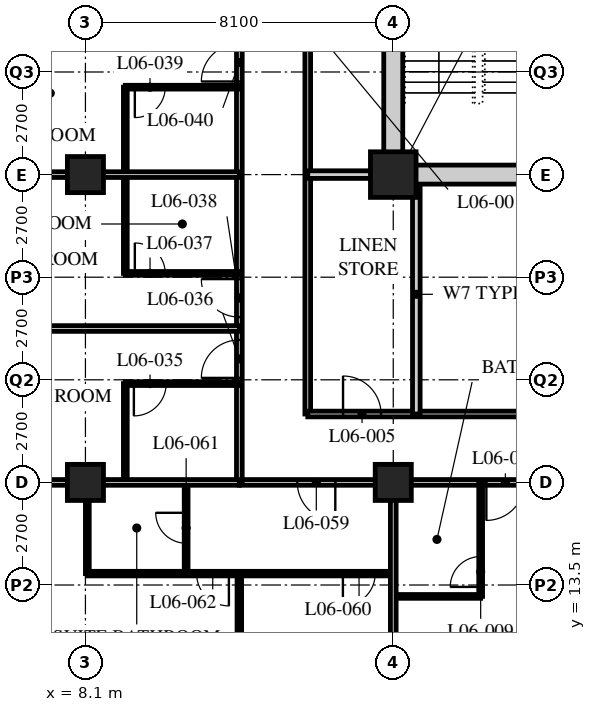
"""IFC4 building model, lengths in metres.
Left out: names, types, materials, properties, quantities, classifications, styles, units other than length and angle.
Written with IfcOpenShell. Run it as: python <this file> out.ifc"""

import sys

from ifc_helpers import new_model, si_unit, direction, frame, frame_2d, origin, origin_2d, place, context, subcontext, project, spatial, rectangle, hollow_rectangle, extrude, element, fill, save


model = new_model("IFC4")
c1 = context("Model", 3, precision=1e-05, world=origin(), true_north=direction((0.0, 1.0)))
c2 = subcontext(c1, "Body", "Model", "MODEL_VIEW")
j1 = project(units=[si_unit("LENGTHUNIT", "METRE"), si_unit("PLANEANGLEUNIT", "RADIAN")], contexts=[c1])
p1 = place(None, origin())
s1 = spatial("IfcSite", under=j1, at=p1, CompositionType="ELEMENT")
p2 = place(p1, origin())
s2 = spatial("IfcBuilding", under=s1, at=p2, CompositionType="ELEMENT")
p3 = place(p2, frame((0.0, 0.0, 33.0)))
s3 = spatial("IfcBuildingStorey", under=s2, at=p3, CompositionType="ELEMENT", Elevation=33.0)
for number, where, z_axis, x_axis in (
    (1, (8.1, 16.2, 0.0), (0.0, 0.0, 1.0), (1.0, 0.0, 0.0)),
    (2, (8.1, 24.3, 0.0), (0.0, 0.0, 1.0), (1.0, 0.0, 0.0)),
    (3, (16.2, 16.2, 0.0), (0.0, 0.0, 1.0), (1.0, 0.0, 0.0)),
):
    element("IfcColumn", number, at=place(p3, frame(where, z_axis=z_axis, x_axis=x_axis)), inside=s3, PredefinedType="COLUMN", context=c2, shape_type="SweptSolid", body=[
        extrude(hollow_rectangle(XDim=0.95, YDim=0.95, WallThickness=0.095, at=origin_2d()), origin(), (0.0, 0.0, 1.0), 3.4),
    ])
p4 = place(p3, frame((16.2, 24.3, 0.0), z_axis=(0.0, 0.0, 1.0), x_axis=(1.0, 0.0, 0.0)))
e4 = element("IfcColumn", 4, at=p4, inside=s3, PredefinedType="COLUMN", context=c2, shape_type="SweptSolid", body=[
    extrude(hollow_rectangle(XDim=1.2, YDim=1.2, WallThickness=0.12, at=origin_2d()), origin(), (0.0, 0.0, 1.0), 3.4),
])
p5 = place(p3, frame((12.15, 16.2, 0.0), z_axis=(0.0, 0.0, 1.0), x_axis=(1.0, 0.0, 0.0)))
e5 = element("IfcWall", 5, at=p5, inside=s3, PredefinedType="PARTITIONING", context=c2, shape_type="SweptSolid", body=[
    extrude(rectangle(XDim=32.4, YDim=0.15, at=frame_2d((16.2, 0.0))), origin(), (0.0, 0.0, 1.0), 2.578),
])
p6 = place(p5, frame((6.5, 0.0, 0.0)))
e6 = element("IfcOpeningElement", 6, at=p6, cuts=e5, PredefinedType="OPENING", context=c2, shape_type="SweptSolid", body=[
    extrude(rectangle(XDim=1.0, YDim=2.1, at=frame_2d((0.5, 1.05))), frame((0.0, 0.085, 0.0), z_axis=(0.0, -1.0, 0.0), x_axis=(1.0, 0.0, 0.0)), (0.0, 0.0, 1.0), 0.17),
])
p7 = place(p5, frame((8.4, 0.0, 0.0)))
e7 = element("IfcOpeningElement", 7, at=p7, cuts=e5, PredefinedType="OPENING", context=c2, shape_type="SweptSolid", body=[
    extrude(rectangle(XDim=1.0, YDim=2.1, at=frame_2d((0.5, 1.05))), frame((0.0, 0.085, 0.0), z_axis=(0.0, -1.0, 0.0), x_axis=(1.0, 0.0, 0.0)), (0.0, 0.0, 1.0), 0.17),
])
p8 = place(p5, frame((14.6, 0.0, 0.0)))
e8 = element("IfcOpeningElement", 8, at=p8, cuts=e5, PredefinedType="OPENING", context=c2, shape_type="SweptSolid", body=[
    extrude(rectangle(XDim=1.0, YDim=2.1, at=frame_2d((0.5, 1.05))), frame((0.0, 0.085, 0.0), z_axis=(0.0, -1.0, 0.0), x_axis=(1.0, 0.0, 0.0)), (0.0, 0.0, 1.0), 0.17),
])
p9 = place(p5, frame((16.5, 0.0, 0.0)))
e9 = element("IfcOpeningElement", 9, at=p9, cuts=e5, PredefinedType="OPENING", context=c2, shape_type="SweptSolid", body=[
    extrude(rectangle(XDim=1.0, YDim=2.1, at=frame_2d((0.5, 1.05))), frame((0.0, 0.085, 0.0), z_axis=(0.0, -1.0, 0.0), x_axis=(1.0, 0.0, 0.0)), (0.0, 0.0, 1.0), 0.17),
])
p10 = place(p5, frame((23.0, 0.0, 0.0)))
e10 = element("IfcOpeningElement", 10, at=p10, cuts=e5, PredefinedType="OPENING", context=c2, shape_type="SweptSolid", body=[
    extrude(rectangle(XDim=1.0, YDim=2.1, at=frame_2d((0.5, 1.05))), frame((0.0, 0.085, 0.0), z_axis=(0.0, -1.0, 0.0), x_axis=(1.0, 0.0, 0.0)), (0.0, 0.0, 1.0), 0.17),
])
p11 = place(p5, frame((24.6, 0.0, 0.0)))
e11 = element("IfcOpeningElement", 11, at=p11, cuts=e5, PredefinedType="OPENING", context=c2, shape_type="SweptSolid", body=[
    extrude(rectangle(XDim=1.0, YDim=2.1, at=frame_2d((0.5, 1.05))), frame((0.0, 0.085, 0.0), z_axis=(0.0, -1.0, 0.0), x_axis=(1.0, 0.0, 0.0)), (0.0, 0.0, 1.0), 0.17),
])
p12 = place(p5, frame((1.525, 0.0, 0.0)))
e12 = element("IfcOpeningElement", 12, at=p12, cuts=e5, PredefinedType="OPENING", context=c2, shape_type="SweptSolid", body=[
    extrude(rectangle(XDim=1.0, YDim=2.1, at=frame_2d((0.5, 1.05))), frame((0.0, 0.085, 0.0), z_axis=(0.0, -1.0, 0.0), x_axis=(1.0, 0.0, 0.0)), (0.0, 0.0, 1.0), 0.17),
])
p13 = place(p5, frame((29.875, 0.0, 0.0)))
e13 = element("IfcOpeningElement", 13, at=p13, cuts=e5, PredefinedType="OPENING", context=c2, shape_type="SweptSolid", body=[
    extrude(rectangle(XDim=1.0, YDim=2.1, at=frame_2d((0.5, 1.05))), frame((0.0, 0.085, 0.0), z_axis=(0.0, -1.0, 0.0), x_axis=(1.0, 0.0, 0.0)), (0.0, 0.0, 1.0), 0.17),
])
p14 = place(p3, frame((12.15, 16.2, 0.0), z_axis=(0.0, 0.0, 1.0), x_axis=(0.0, 1.0, 0.0)))
e14 = element("IfcWall", 14, at=p14, inside=s3, PredefinedType="PARTITIONING", context=c2, shape_type="SweptSolid", body=[
    extrude(rectangle(XDim=26.1, YDim=0.15, at=frame_2d((13.05, 0.0))), origin(), (0.0, 0.0, 1.0), 3.19),
])
p15 = place(p14, frame((2.75, 0.0, 0.0)))
e15 = element("IfcOpeningElement", 15, at=p15, cuts=e14, PredefinedType="OPENING", context=c2, shape_type="SweptSolid", body=[
    extrude(rectangle(XDim=1.0, YDim=2.1, at=frame_2d((0.5, 1.05))), frame((0.0, 0.085, 0.0), z_axis=(0.0, -1.0, 0.0), x_axis=(1.0, 0.0, 0.0)), (0.0, 0.0, 1.0), 0.17),
])
p16 = place(p14, frame((4.35, 0.0, 0.0)))
e16 = element("IfcOpeningElement", 16, at=p16, cuts=e14, PredefinedType="OPENING", context=c2, shape_type="SweptSolid", body=[
    extrude(rectangle(XDim=1.0, YDim=2.1, at=frame_2d((0.5, 1.05))), frame((0.0, 0.085, 0.0), z_axis=(0.0, -1.0, 0.0), x_axis=(1.0, 0.0, 0.0)), (0.0, 0.0, 1.0), 0.17),
])
p17 = place(p14, frame((10.55, 0.0, 0.0)))
e17 = element("IfcOpeningElement", 17, at=p17, cuts=e14, PredefinedType="OPENING", context=c2, shape_type="SweptSolid", body=[
    extrude(rectangle(XDim=1.0, YDim=2.1, at=frame_2d((0.5, 1.05))), frame((0.0, 0.085, 0.0), z_axis=(0.0, -1.0, 0.0), x_axis=(1.0, 0.0, 0.0)), (0.0, 0.0, 1.0), 0.17),
])
p18 = place(p14, frame((12.45, 0.0, 0.0)))
e18 = element("IfcOpeningElement", 18, at=p18, cuts=e14, PredefinedType="OPENING", context=c2, shape_type="SweptSolid", body=[
    extrude(rectangle(XDim=1.0, YDim=2.1, at=frame_2d((0.5, 1.05))), frame((0.0, 0.085, 0.0), z_axis=(0.0, -1.0, 0.0), x_axis=(1.0, 0.0, 0.0)), (0.0, 0.0, 1.0), 0.17),
])
p19 = place(p14, frame((18.65, 0.0, 0.0)))
e19 = element("IfcOpeningElement", 19, at=p19, cuts=e14, PredefinedType="OPENING", context=c2, shape_type="SweptSolid", body=[
    extrude(rectangle(XDim=1.0, YDim=2.1, at=frame_2d((0.5, 1.05))), frame((0.0, 0.085, 0.0), z_axis=(0.0, -1.0, 0.0), x_axis=(1.0, 0.0, 0.0)), (0.0, 0.0, 1.0), 0.17),
])
p20 = place(p14, frame((22.65, 0.0, 0.0)))
e20 = element("IfcOpeningElement", 20, at=p20, cuts=e14, PredefinedType="OPENING", context=c2, shape_type="SweptSolid", body=[
    extrude(rectangle(XDim=1.0, YDim=2.1, at=frame_2d((0.5, 1.05))), frame((0.0, 0.085, 0.0), z_axis=(0.0, -1.0, 0.0), x_axis=(1.0, 0.0, 0.0)), (0.0, 0.0, 1.0), 0.17),
])
p21 = place(p3, frame((13.95, 40.5, 0.0), z_axis=(0.0, 0.0, 1.0), x_axis=(0.0, -1.0, 0.0)))
e21 = element("IfcWall", 21, at=p21, inside=s3, PredefinedType="PARTITIONING", context=c2, shape_type="SweptSolid", body=[
    extrude(rectangle(XDim=22.5, YDim=0.15, at=frame_2d((11.25, 0.0))), origin(), (0.0, 0.0, 1.0), 3.19),
])
p22 = place(p21, frame((11.65, 0.0, 0.0)))
e22 = element("IfcOpeningElement", 22, at=p22, cuts=e21, PredefinedType="OPENING", context=c2, shape_type="SweptSolid", body=[
    extrude(rectangle(XDim=1.0, YDim=2.1, at=frame_2d((0.5, 1.05))), frame((0.0, 0.085, 0.0), z_axis=(0.0, -1.0, 0.0), x_axis=(1.0, 0.0, 0.0)), (0.0, 0.0, 1.0), 0.17),
])
p23 = place(p21, frame((3.55, 0.0, 0.0)))
e23 = element("IfcOpeningElement", 23, at=p23, cuts=e21, PredefinedType="OPENING", context=c2, shape_type="SweptSolid", body=[
    extrude(rectangle(XDim=1.0, YDim=2.1, at=frame_2d((0.5, 1.05))), frame((0.0, 0.085, 0.0), z_axis=(0.0, -1.0, 0.0), x_axis=(1.0, 0.0, 0.0)), (0.0, 0.0, 1.0), 0.17),
])
p24 = place(p3, frame((13.95, 18.0, 0.0), z_axis=(0.0, 0.0, 1.0), x_axis=(1.0, 0.0, 0.0)))
e24 = element("IfcWall", 24, at=p24, inside=s3, PredefinedType="PARTITIONING", context=c2, shape_type="SweptSolid", body=[
    extrude(rectangle(XDim=13.19, YDim=0.15, at=frame_2d((6.595, 0.0))), origin(), (0.0, 0.0, 1.0), 3.19),
])
p25 = place(p24, frame((0.929, 0.0, 0.0)))
e25 = element("IfcOpeningElement", 25, at=p25, cuts=e24, PredefinedType="OPENING", context=c2, shape_type="SweptSolid", body=[
    extrude(rectangle(XDim=1.0, YDim=2.1, at=frame_2d((0.5, 1.05))), frame((0.0, 0.085, 0.0), z_axis=(0.0, -1.0, 0.0), x_axis=(1.0, 0.0, 0.0)), (0.0, 0.0, 1.0), 0.17),
])
p26 = place(p24, frame((7.529, 0.0, 0.0)))
e26 = element("IfcOpeningElement", 26, at=p26, cuts=e24, PredefinedType="OPENING", context=c2, shape_type="SweptSolid", body=[
    extrude(rectangle(XDim=1.0, YDim=2.1, at=frame_2d((0.5, 1.05))), frame((0.0, 0.085, 0.0), z_axis=(0.0, -1.0, 0.0), x_axis=(1.0, 0.0, 0.0)), (0.0, 0.0, 1.0), 0.17),
])
p27 = place(p3, frame((16.807, 18.0, 0.0), z_axis=(0.0, 0.0, 1.0), x_axis=(0.0, 1.0, 0.0)))
e27 = element("IfcWall", 27, at=p27, inside=s3, PredefinedType="SOLIDWALL", context=c2, shape_type="SweptSolid", body=[
    extrude(rectangle(XDim=6.3, YDim=0.2, at=frame_2d((3.15, 0.0))), origin(), (0.0, 0.0, 1.0), 3.19),
])
p28 = place(p3, frame((13.95, 24.3, 0.0), z_axis=(0.0, 0.0, 1.0), x_axis=(1.0, 0.0, 0.0)))
e28 = element("IfcWall", 28, at=p28, inside=s3, PredefinedType="SOLIDWALL", context=c2, shape_type="SweptSolid", body=[
    extrude(rectangle(XDim=2.25, YDim=0.2, at=frame_2d((1.125, 0.0))), origin(), (0.0, 0.0, 1.0), 2.578),
])
p29 = place(p3, frame((16.2, 13.2, 0.0), z_axis=(0.0, 0.0, 1.0), x_axis=(1.0, 0.0, 0.0)))
e29 = element("IfcWall", 29, at=p29, inside=s3, PredefinedType="PARTITIONING", context=c2, shape_type="SweptSolid", body=[
    extrude(rectangle(XDim=2.3, YDim=0.1, at=frame_2d((1.15, 0.0))), origin(), (0.0, 0.0, 1.0), 3.19),
])
p30 = place(p3, frame((18.5, 16.2, 0.0), z_axis=(0.0, 0.0, 1.0), x_axis=(0.0, -1.0, 0.0)))
e30 = element("IfcWall", 30, at=p30, inside=s3, PredefinedType="PARTITIONING", context=c2, shape_type="SweptSolid", body=[
    extrude(rectangle(XDim=3.0, YDim=0.1, at=frame_2d((1.5, 0.0))), origin(), (0.0, 0.0, 1.0), 3.19),
])
p31 = place(p30, frame((1.95, 0.0, 0.0)))
e31 = element("IfcOpeningElement", 31, at=p31, cuts=e30, PredefinedType="OPENING", context=c2, shape_type="SweptSolid", body=[
    extrude(rectangle(XDim=0.8, YDim=2.1, at=frame_2d((0.4, 1.05))), frame((0.0, 0.06, 0.0), z_axis=(0.0, -1.0, 0.0), x_axis=(1.0, 0.0, 0.0)), (0.0, 0.0, 1.0), 0.12),
])
p32 = place(p3, frame((9.15, 16.2, 0.0), z_axis=(0.0, 0.0, 1.0), x_axis=(0.0, 1.0, 0.0)))
e32 = element("IfcWall", 32, at=p32, inside=s3, PredefinedType="PARTITIONING", context=c2, shape_type="SweptSolid", body=[
    extrude(rectangle(XDim=2.6, YDim=0.1, at=frame_2d((1.3, 0.0))), origin(), (0.0, 0.0, 1.0), 3.19),
])
p33 = place(p3, frame((12.15, 18.8, 0.0), z_axis=(0.0, 0.0, 1.0), x_axis=(-1.0, 0.0, 0.0)))
e33 = element("IfcWall", 33, at=p33, inside=s3, PredefinedType="PARTITIONING", context=c2, shape_type="SweptSolid", body=[
    extrude(rectangle(XDim=3.0, YDim=0.1, at=frame_2d((1.5, 0.0))), origin(), (0.0, 0.0, 1.0), 3.19),
])
p34 = place(p33, frame((1.925, 0.0, 0.0)))
e34 = element("IfcOpeningElement", 34, at=p34, cuts=e33, PredefinedType="OPENING", context=c2, shape_type="SweptSolid", body=[
    extrude(rectangle(XDim=0.85, YDim=2.1, at=frame_2d((0.425, 1.05))), frame((0.0, 0.06, 0.0), z_axis=(0.0, -1.0, 0.0), x_axis=(1.0, 0.0, 0.0)), (0.0, 0.0, 1.0), 0.12),
])
p35 = place(p3, frame((12.15, 20.25, 0.0), z_axis=(0.0, 0.0, 1.0), x_axis=(-1.0, 0.0, 0.0)))
e35 = element("IfcWall", 35, at=p35, inside=s3, PredefinedType="PARTITIONING", context=c2, shape_type="SweptSolid", body=[
    extrude(rectangle(XDim=11.85, YDim=0.15, at=frame_2d((5.925, 0.0))), origin(), (0.0, 0.0, 1.0), 3.19),
])
p36 = place(p3, frame((9.15, 21.7, 0.0), z_axis=(0.0, 0.0, 1.0), x_axis=(0.0, 1.0, 0.0)))
e36 = element("IfcWall", 36, at=p36, inside=s3, PredefinedType="PARTITIONING", context=c2, shape_type="SweptSolid", body=[
    extrude(rectangle(XDim=4.9, YDim=0.1, at=frame_2d((2.45, 0.0))), origin(), (0.0, 0.0, 1.0), 3.19),
])
p37 = place(p3, frame((12.15, 21.7, 0.0), z_axis=(0.0, 0.0, 1.0), x_axis=(-1.0, 0.0, 0.0)))
e37 = element("IfcWall", 37, at=p37, inside=s3, PredefinedType="PARTITIONING", context=c2, shape_type="SweptSolid", body=[
    extrude(rectangle(XDim=3.0, YDim=0.1, at=frame_2d((1.5, 0.0))), origin(), (0.0, 0.0, 1.0), 3.19),
])
p38 = place(p37, frame((1.95, 0.0, 0.0)))
e38 = element("IfcOpeningElement", 38, at=p38, cuts=e37, PredefinedType="OPENING", context=c2, shape_type="SweptSolid", body=[
    extrude(rectangle(XDim=0.8, YDim=2.1, at=frame_2d((0.4, 1.05))), frame((0.0, 0.06, 0.0), z_axis=(0.0, -1.0, 0.0), x_axis=(1.0, 0.0, 0.0)), (0.0, 0.0, 1.0), 0.12),
])
p39 = place(p3, frame((12.15, 24.3, 0.0), z_axis=(0.0, 0.0, 1.0), x_axis=(-1.0, 0.0, 0.0)))
e39 = element("IfcWall", 39, at=p39, inside=s3, PredefinedType="PARTITIONING", context=c2, shape_type="SweptSolid", body=[
    extrude(rectangle(XDim=11.85, YDim=0.15, at=frame_2d((5.925, 0.0))), origin(), (0.0, 0.0, 1.0), 2.578),
])
p40 = place(p3, frame((12.15, 26.6, 0.0), z_axis=(0.0, 0.0, 1.0), x_axis=(-1.0, 0.0, 0.0)))
e40 = element("IfcWall", 40, at=p40, inside=s3, PredefinedType="PARTITIONING", context=c2, shape_type="SweptSolid", body=[
    extrude(rectangle(XDim=3.0, YDim=0.1, at=frame_2d((1.5, 0.0))), origin(), (0.0, 0.0, 1.0), 3.19),
])
p41 = place(p40, frame((1.95, 0.0, 0.0)))
e41 = element("IfcOpeningElement", 41, at=p41, cuts=e40, PredefinedType="OPENING", context=c2, shape_type="SweptSolid", body=[
    extrude(rectangle(XDim=0.8, YDim=2.1, at=frame_2d((0.4, 1.05))), frame((0.0, 0.06, 0.0), z_axis=(0.0, -1.0, 0.0), x_axis=(1.0, 0.0, 0.0)), (0.0, 0.0, 1.0), 0.12),
])
p42 = place(p3, frame((10.75, 16.2, 0.0), z_axis=(0.0, 0.0, 1.0), x_axis=(0.0, -1.0, 0.0)))
e42 = element("IfcWall", 42, at=p42, inside=s3, PredefinedType="PARTITIONING", context=c2, shape_type="SweptSolid", body=[
    extrude(rectangle(XDim=2.4, YDim=0.1, at=frame_2d((1.2, 0.0))), origin(), (0.0, 0.0, 1.0), 3.19),
])
p43 = place(p42, frame((0.8, 0.0, 0.0)))
e43 = element("IfcOpeningElement", 43, at=p43, cuts=e42, PredefinedType="OPENING", context=c2, shape_type="SweptSolid", body=[
    extrude(rectangle(XDim=0.8, YDim=2.1, at=frame_2d((0.4, 1.05))), frame((0.0, 0.06, 0.0), z_axis=(0.0, -1.0, 0.0), x_axis=(1.0, 0.0, 0.0)), (0.0, 0.0, 1.0), 0.12),
])
p44 = place(p3, frame((8.15, 16.2, 0.0), z_axis=(0.0, 0.0, 1.0), x_axis=(0.0, -1.0, 0.0)))
e44 = element("IfcWall", 44, at=p44, inside=s3, PredefinedType="PARTITIONING", context=c2, shape_type="SweptSolid", body=[
    extrude(rectangle(XDim=2.4, YDim=0.1, at=frame_2d((1.2, 0.0))), origin(), (0.0, 0.0, 1.0), 2.578),
])
p45 = place(p3, frame((8.15, 13.8, 0.0), z_axis=(0.0, 0.0, 1.0), x_axis=(1.0, 0.0, 0.0)))
e45 = element("IfcWall", 45, at=p45, inside=s3, PredefinedType="PARTITIONING", context=c2, shape_type="SweptSolid", body=[
    extrude(rectangle(XDim=8.05, YDim=0.12, at=frame_2d((4.025, 0.0))), origin(), (0.0, 0.0, 1.0), 3.19),
])
p46 = place(p45, frame((6.725, 0.0, 0.0)))
e46 = element("IfcOpeningElement", 46, at=p46, cuts=e45, PredefinedType="OPENING", context=c2, shape_type="SweptSolid", body=[
    extrude(rectangle(XDim=0.85, YDim=2.1, at=frame_2d((0.425, 1.05))), frame((0.0, 0.07, 0.0), z_axis=(0.0, -1.0, 0.0), x_axis=(1.0, 0.0, 0.0)), (0.0, 0.0, 1.0), 0.14),
])
p47 = place(p45, frame((2.875, 0.0, 0.0)))
e47 = element("IfcOpeningElement", 47, at=p47, cuts=e45, PredefinedType="OPENING", context=c2, shape_type="SweptSolid", body=[
    extrude(rectangle(XDim=0.85, YDim=2.1, at=frame_2d((0.425, 1.05))), frame((0.0, 0.07, 0.0), z_axis=(0.0, -1.0, 0.0), x_axis=(1.0, 0.0, 0.0)), (0.0, 0.0, 1.0), 0.14),
])
p48 = place(p3, frame((12.15, 13.8, 0.0), z_axis=(0.0, 0.0, 1.0), x_axis=(0.0, -1.0, 0.0)))
e48 = element("IfcWall", 48, at=p48, inside=s3, PredefinedType="PARTITIONING", context=c2, shape_type="SweptSolid", body=[
    extrude(rectangle(XDim=13.5, YDim=0.12, at=frame_2d((6.75, 0.0))), origin(), (0.0, 0.0, 1.0), 3.19),
])
p49 = place(p3, frame((0.3, 16.2, 0.0), z_axis=(0.0, 0.0, 1.0), x_axis=(1.0, 0.0, 0.0)))
e49 = element("IfcWall", 49, at=p49, inside=s3, PredefinedType="PARTITIONING", context=c2, shape_type="SweptSolid", body=[
    extrude(rectangle(XDim=11.85, YDim=0.15, at=frame_2d((5.925, 0.0))), origin(), (0.0, 0.0, 1.0), 2.578),
])
p50 = place(p3, frame((16.2, 16.2, 0.0), z_axis=(0.0, 0.0, 1.0), x_axis=(0.0, -1.0, 0.0)))
e50 = element("IfcWall", 50, at=p50, inside=s3, PredefinedType="PARTITIONING", context=c2, shape_type="SweptSolid", body=[
    extrude(rectangle(XDim=15.9, YDim=0.15, at=frame_2d((7.95, 0.0))), origin(), (0.0, 0.0, 1.0), 2.578),
])
p51 = place(p3, frame((15.95, 24.3, 0.0), z_axis=(0.0, 0.0, 1.0), x_axis=(1.0, 0.0, 0.0)))
e51 = element("IfcWall", 51, at=p51, inside=s3, PredefinedType="SOLIDWALL", context=c2, shape_type="SweptSolid", body=[
    extrude(rectangle(XDim=24.8, YDim=0.5, at=frame_2d((12.4, 0.0))), origin(), (0.0, 0.0, 1.0), 2.54),
])
p52 = place(p51, frame((11.5, 0.0, 0.0)))
e52 = element("IfcOpeningElement", 52, at=p52, cuts=e51, PredefinedType="OPENING", context=c2, shape_type="SweptSolid", body=[
    extrude(rectangle(XDim=1.8, YDim=2.4, at=frame_2d((0.9, 1.2))), frame((0.0, 0.26, 0.0), z_axis=(0.0, -1.0, 0.0), x_axis=(1.0, 0.0, 0.0)), (0.0, 0.0, 1.0), 0.52),
])
p53 = place(p3, frame((16.2, 24.55, 0.0), z_axis=(0.0, 0.0, 1.0), x_axis=(0.0, 1.0, 0.0)))
e53 = element("IfcWall", 53, at=p53, inside=s3, PredefinedType="SOLIDWALL", context=c2, shape_type="SweptSolid", body=[
    extrude(rectangle(XDim=15.7, YDim=0.5, at=frame_2d((7.85, 0.0))), origin(), (0.0, 0.0, 1.0), 2.578),
])
p54 = place(p25, origin())
e54 = element("IfcDoor", 54, at=p54, inside=s3, OperationType="SINGLE_SWING_LEFT", PredefinedType="DOOR", context=c2, shape_type="SweptSolid", body=[
    extrude(rectangle(XDim=1.0, YDim=2.1, at=frame_2d((0.5, 1.05))), frame((0.0, 0.025, 0.0), z_axis=(0.0, -1.0, 0.0), x_axis=(1.0, 0.0, 0.0)), (0.0, 0.0, 1.0), 0.05),
])
fill(e25, e54)
p55 = place(p31, origin())
e55 = element("IfcDoor", 55, at=p55, inside=s3, OperationType="SINGLE_SWING_LEFT", PredefinedType="DOOR", context=c2, shape_type="SweptSolid", body=[
    extrude(rectangle(XDim=0.8, YDim=2.1, at=frame_2d((0.4, 1.05))), frame((0.0, 0.025, 0.0), z_axis=(0.0, -1.0, 0.0), x_axis=(1.0, 0.0, 0.0)), (0.0, 0.0, 1.0), 0.05),
])
fill(e31, e55)
p56 = place(p6, origin())
e56 = element("IfcDoor", 56, at=p56, inside=s3, OperationType="SINGLE_SWING_RIGHT", PredefinedType="DOOR", context=c2, shape_type="SweptSolid", body=[
    extrude(rectangle(XDim=1.0, YDim=2.1, at=frame_2d((0.5, 1.05))), frame((0.0, 0.025, 0.0), z_axis=(0.0, -1.0, 0.0), x_axis=(1.0, 0.0, 0.0)), (0.0, 0.0, 1.0), 0.05),
])
fill(e6, e56)
p57 = place(p34, origin())
e57 = element("IfcDoor", 57, at=p57, inside=s3, OperationType="SINGLE_SWING_RIGHT", PredefinedType="DOOR", context=c2, shape_type="SweptSolid", body=[
    extrude(rectangle(XDim=0.85, YDim=2.1, at=frame_2d((0.425, 1.05))), frame((0.0, 0.025, 0.0), z_axis=(0.0, -1.0, 0.0), x_axis=(1.0, 0.0, 0.0)), (0.0, 0.0, 1.0), 0.05),
])
fill(e34, e57)
p58 = place(p15, origin())
e58 = element("IfcDoor", 58, at=p58, inside=s3, OperationType="SINGLE_SWING_LEFT", PredefinedType="DOOR", context=c2, shape_type="SweptSolid", body=[
    extrude(rectangle(XDim=1.0, YDim=2.1, at=frame_2d((0.5, 1.05))), frame((0.0, 0.025, 0.0), z_axis=(0.0, -1.0, 0.0), x_axis=(1.0, 0.0, 0.0)), (0.0, 0.0, 1.0), 0.05),
])
fill(e15, e58)
p59 = place(p38, origin())
e59 = element("IfcDoor", 59, at=p59, inside=s3, OperationType="SINGLE_SWING_LEFT", PredefinedType="DOOR", context=c2, shape_type="SweptSolid", body=[
    extrude(rectangle(XDim=0.8, YDim=2.1, at=frame_2d((0.4, 1.05))), frame((0.0, 0.025, 0.0), z_axis=(0.0, -1.0, 0.0), x_axis=(1.0, 0.0, 0.0)), (0.0, 0.0, 1.0), 0.05),
])
fill(e38, e59)
p60 = place(p16, origin())
e60 = element("IfcDoor", 60, at=p60, inside=s3, OperationType="SINGLE_SWING_RIGHT", PredefinedType="DOOR", context=c2, shape_type="SweptSolid", body=[
    extrude(rectangle(XDim=1.0, YDim=2.1, at=frame_2d((0.5, 1.05))), frame((0.0, 0.025, 0.0), z_axis=(0.0, -1.0, 0.0), x_axis=(1.0, 0.0, 0.0)), (0.0, 0.0, 1.0), 0.05),
])
fill(e16, e60)
p61 = place(p41, origin())
e61 = element("IfcDoor", 61, at=p61, inside=s3, OperationType="SINGLE_SWING_RIGHT", PredefinedType="DOOR", context=c2, shape_type="SweptSolid", body=[
    extrude(rectangle(XDim=0.8, YDim=2.1, at=frame_2d((0.4, 1.05))), frame((0.0, 0.025, 0.0), z_axis=(0.0, -1.0, 0.0), x_axis=(1.0, 0.0, 0.0)), (0.0, 0.0, 1.0), 0.05),
])
fill(e41, e61)
p62 = place(p17, origin())
e62 = element("IfcDoor", 62, at=p62, inside=s3, OperationType="SINGLE_SWING_LEFT", PredefinedType="DOOR", context=c2, shape_type="SweptSolid", body=[
    extrude(rectangle(XDim=1.0, YDim=2.1, at=frame_2d((0.5, 1.05))), frame((0.0, 0.025, 0.0), z_axis=(0.0, -1.0, 0.0), x_axis=(1.0, 0.0, 0.0)), (0.0, 0.0, 1.0), 0.05),
])
fill(e17, e62)
p63 = place(p12, origin())
e63 = element("IfcDoor", 63, at=p63, inside=s3, OperationType="SINGLE_SWING_LEFT", PredefinedType="DOOR", context=c2, shape_type="SweptSolid", body=[
    extrude(rectangle(XDim=1.0, YDim=2.1, at=frame_2d((0.5, 1.05))), frame((0.0, 0.025, 0.0), z_axis=(0.0, -1.0, 0.0), x_axis=(1.0, 0.0, 0.0)), (0.0, 0.0, 1.0), 0.05),
])
fill(e12, e63)
p64 = place(p46, origin())
e64 = element("IfcDoor", 64, at=p64, inside=s3, OperationType="SINGLE_SWING_RIGHT", PredefinedType="DOOR", context=c2, shape_type="SweptSolid", body=[
    extrude(rectangle(XDim=0.85, YDim=2.1, at=frame_2d((0.425, 1.05))), frame((0.0, 0.025, 0.0), z_axis=(0.0, -1.0, 0.0), x_axis=(1.0, 0.0, 0.0)), (0.0, 0.0, 1.0), 0.05),
])
fill(e46, e64)
p65 = place(p43, origin())
e65 = element("IfcDoor", 65, at=p65, inside=s3, OperationType="SINGLE_SWING_RIGHT", PredefinedType="DOOR", context=c2, shape_type="SweptSolid", body=[
    extrude(rectangle(XDim=0.8, YDim=2.1, at=frame_2d((0.4, 1.05))), frame((0.0, 0.025, 0.0), z_axis=(0.0, -1.0, 0.0), x_axis=(1.0, 0.0, 0.0)), (0.0, 0.0, 1.0), 0.05),
])
fill(e43, e65)
p66 = place(p47, origin())
e66 = element("IfcDoor", 66, at=p66, inside=s3, OperationType="SINGLE_SWING_LEFT", PredefinedType="DOOR", context=c2, shape_type="SweptSolid", body=[
    extrude(rectangle(XDim=0.85, YDim=2.1, at=frame_2d((0.425, 1.05))), frame((0.0, 0.025, 0.0), z_axis=(0.0, -1.0, 0.0), x_axis=(1.0, 0.0, 0.0)), (0.0, 0.0, 1.0), 0.05),
])
fill(e47, e66)
save(model, sys.argv[1])
